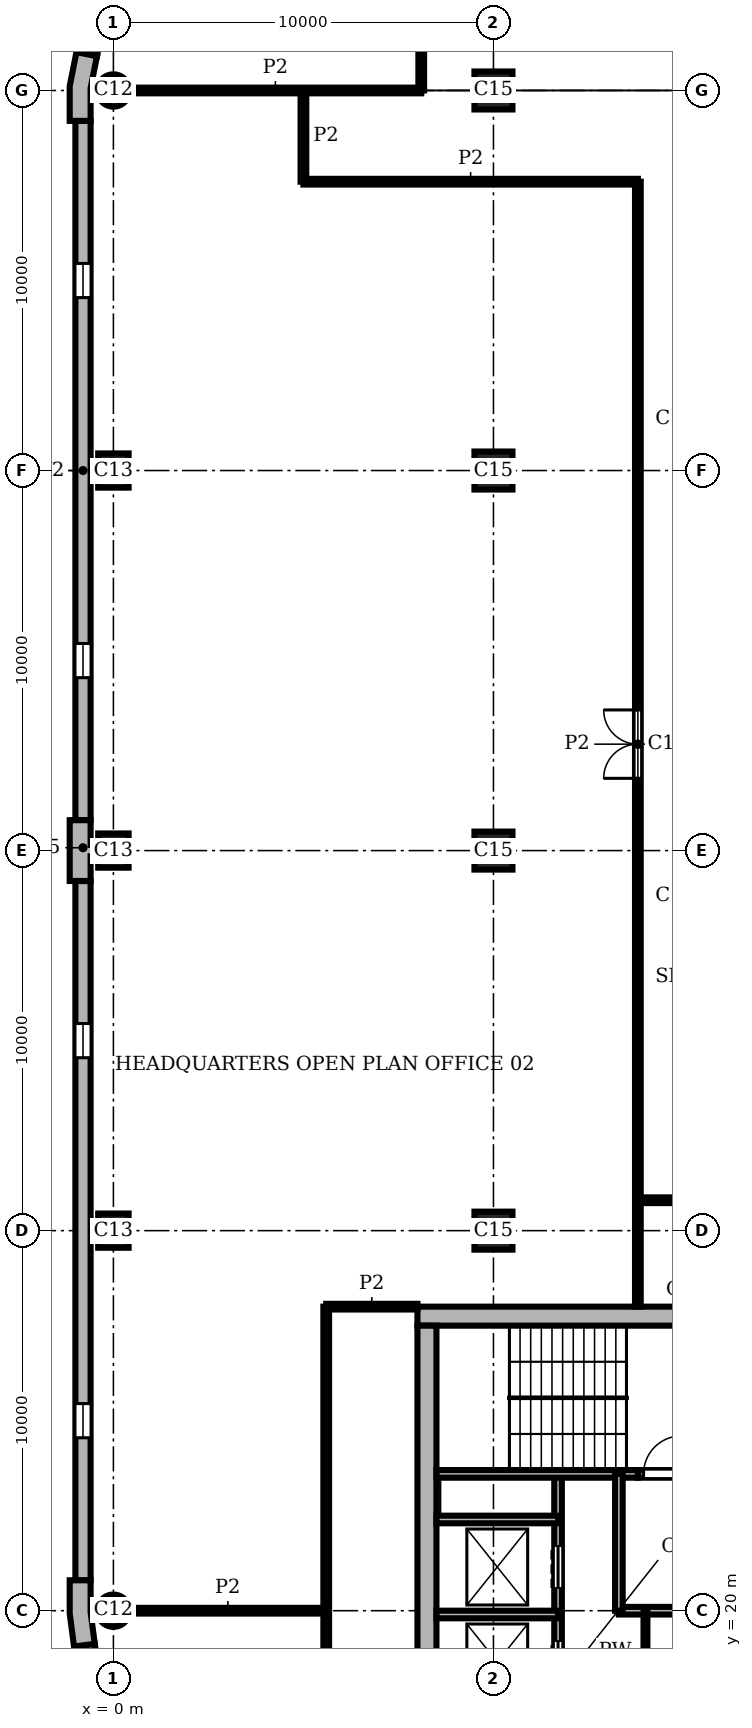
"""IFC4 building model, lengths in metres.
Left out: names, types, materials, properties, quantities, classifications, styles, units other than length and angle.
Written with IfcOpenShell. Run it as: python <this file> out.ifc"""

import sys

from ifc_helpers import new_model, si_unit, direction, frame, frame_2d, origin, origin_2d, place, context, subcontext, project, spatial, polyline, rectangle, circle, outline, extrude, element, fill, save


model = new_model("IFC4")
c1 = context("Model", 3, precision=1e-05, world=origin(), true_north=direction((0.0, 1.0)))
c2 = subcontext(c1, "Body", "Model", "MODEL_VIEW")
j1 = project(units=[si_unit("LENGTHUNIT", "METRE"), si_unit("PLANEANGLEUNIT", "RADIAN")], contexts=[c1])
p1 = place(None, origin())
s1 = spatial("IfcSite", under=j1, at=p1, CompositionType="ELEMENT")
p2 = place(p1, origin())
s2 = spatial("IfcBuilding", under=s1, at=p2, CompositionType="ELEMENT")
p3 = place(p2, frame((0.0, 0.0, 348.9)))
s3 = spatial("IfcBuildingStorey", under=s2, at=p3, CompositionType="ELEMENT", Elevation=348.9)
p4 = place(p3, frame((0.0, 60.0, 0.0), z_axis=(0.0, 0.0, 1.0), x_axis=(1.0, 0.0, 0.0)))
e1 = element("IfcColumn", 1, at=p4, inside=s3, PredefinedType="COLUMN", context=c2, shape_type="SweptSolid", body=[
    extrude(circle(Radius=0.425, at=origin_2d()), origin(), (0.0, 0.0, 1.0), 3.9),
])
for number, where, z_axis, x_axis in (
    (2, (0.0, 50.0, 0.0), (0.0, 0.0, 1.0), (0.0, 1.0, 0.0)),
    (3, (0.0, 40.0, 0.0), (0.0, 0.0, 1.0), (0.0, 1.0, 0.0)),
    (4, (0.0, 30.0, 0.0), (0.0, 0.0, 1.0), (0.0, 1.0, 0.0)),
):
    element("IfcColumn", number, at=place(p3, frame(where, z_axis=z_axis, x_axis=x_axis)), inside=s3, PredefinedType="COLUMN", context=c2, shape_type="SweptSolid", body=[
        extrude(rectangle(XDim=0.9, YDim=0.8, at=origin_2d()), origin(), (0.0, 0.0, 1.0), 3.9),
    ])
p5 = place(p3, frame((0.0, 20.0, 0.0), z_axis=(0.0, 0.0, 1.0), x_axis=(1.0, 0.0, 0.0)))
e5 = element("IfcColumn", 5, at=p5, inside=s3, PredefinedType="COLUMN", context=c2, shape_type="SweptSolid", body=[
    extrude(circle(Radius=0.425, at=origin_2d()), origin(), (0.0, 0.0, 1.0), 3.9),
])
for number, where, z_axis, x_axis in (
    (6, (10.0, 30.0, 0.0), (0.0, 0.0, 1.0), (1.0, 0.0, 0.0)),
    (7, (10.0, 40.0, 0.0), (0.0, 0.0, 1.0), (1.0, 0.0, 0.0)),
    (8, (10.0, 50.0, 0.0), (0.0, 0.0, 1.0), (1.0, 0.0, 0.0)),
    (9, (10.0, 60.0, 0.0), (0.0, 0.0, 1.0), (1.0, 0.0, 0.0)),
):
    element("IfcColumn", number, at=place(p3, frame(where, z_axis=z_axis, x_axis=x_axis)), inside=s3, PredefinedType="COLUMN", context=c2, shape_type="SweptSolid", body=[
        extrude(rectangle(XDim=1.0, YDim=1.0, at=origin_2d()), origin(), (0.0, 0.0, 1.0), 3.9),
    ])
p6 = place(p3, frame((28.0, 27.75, 0.0), z_axis=(0.0, 0.0, 1.0), x_axis=(-1.0, 0.0, 0.0)))
e10 = element("IfcWall", 10, at=p6, inside=s3, PredefinedType="SHEAR", context=c2, shape_type="SweptSolid", body=[
    extrude(rectangle(XDim=20.0, YDim=0.5, at=frame_2d((10.0, 0.0))), origin(), (0.0, 0.0, 1.0), 3.9),
])
p7 = place(p3, frame((8.25, 27.5, 0.0), z_axis=(0.0, 0.0, 1.0), x_axis=(0.0, -1.0, 0.0)))
e11 = element("IfcWall", 11, at=p7, inside=s3, PredefinedType="SHEAR", context=c2, shape_type="SweptSolid", body=[
    extrude(rectangle(XDim=19.0, YDim=0.5, at=frame_2d((9.5, 0.0))), origin(), (0.0, 0.0, 1.0), 3.9),
])
p8 = place(p3, origin())
e12 = element("IfcWall", 12, at=p8, inside=s3, PredefinedType="SOLIDWALL", context=c2, shape_type="SweptSolid", body=[
    extrude(outline(polyline([(-0.825, 60.98), (-0.972, 61.009), (-1.15, 60.113), (-1.15, 59.2), (-1.0, 59.2), (-0.6, 59.2), (-0.6, 60.059), (-0.432, 60.902), (-0.825, 60.98)])), origin(), (0.0, 0.0, 1.0), 3.9),
])
e13 = element("IfcWall", 13, at=p8, inside=s3, PredefinedType="SOLIDWALL", context=c2, shape_type="SweptSolid", body=[
    extrude(outline(polyline([(-0.6, 39.2), (-0.6, 39.85), (-0.45, 39.85), (-0.45, 40.15), (-0.6, 40.15), (-0.6, 40.8), (-1.0, 40.8), (-1.15, 40.8), (-1.15, 40.0), (-1.15, 39.2), (-1.0, 39.2), (-0.6, 39.2)])), origin(), (0.0, 0.0, 1.0), 3.9),
])
e14 = element("IfcWall", 14, at=p8, inside=s3, PredefinedType="SOLIDWALL", context=c2, shape_type="SweptSolid", body=[
    extrude(outline(polyline([(-1.0, 20.8), (-1.15, 20.8), (-1.15, 19.925), (-1.036, 19.057), (-0.887, 19.076), (-0.49, 19.128), (-0.6, 19.961), (-0.6, 20.8), (-1.0, 20.8)])), origin(), (0.0, 0.0, 1.0), 3.9),
])
p9 = place(p3, frame((0.299, 65.602, 0.0), z_axis=(0.0, 0.0, 1.0), x_axis=(-0.195098533057, -0.98078364709, 0.0)))
e15 = element("IfcWall", 15, at=p9, inside=s3, PredefinedType="SOLIDWALL", context=c2, shape_type="SweptSolid", body=[
    extrude(rectangle(XDim=4.753, YDim=0.4, at=frame_2d((2.376, 0.0))), origin(), (0.0, 0.0, 1.0), 3.9),
])
p10 = place(p9, frame((0.226, 0.0, 0.9)))
e16 = element("IfcOpeningElement", 16, at=p10, cuts=e15, PredefinedType="OPENING", context=c2, shape_type="SweptSolid", body=[
    extrude(rectangle(XDim=4.3, YDim=2.35, at=frame_2d((2.15, 1.175))), frame((0.0, 0.21, 0.0), z_axis=(0.0, -1.0, 0.0), x_axis=(1.0, 0.0, 0.0)), (0.0, 0.0, 1.0), 0.42),
])
p11 = place(p3, frame((-0.8, 59.2, 0.0), z_axis=(0.0, 0.0, 1.0), x_axis=(0.0, -1.0, 0.0)))
e17 = element("IfcWall", 17, at=p11, inside=s3, PredefinedType="SOLIDWALL", context=c2, shape_type="SweptSolid", body=[
    extrude(rectangle(XDim=18.4, YDim=0.4, at=frame_2d((9.2, 0.0))), origin(), (0.0, 0.0, 1.0), 3.9),
])
p12 = place(p11, frame((3.75, 0.0, 0.9)))
e18 = element("IfcOpeningElement", 18, at=p12, cuts=e17, PredefinedType="OPENING", context=c2, shape_type="SweptSolid", body=[
    extrude(rectangle(XDim=0.9, YDim=2.35, at=frame_2d((0.45, 1.175))), frame((0.0, 0.21, 0.0), z_axis=(0.0, -1.0, 0.0), x_axis=(1.0, 0.0, 0.0)), (0.0, 0.0, 1.0), 0.42),
])
p13 = place(p11, frame((13.75, 0.0, 0.9)))
e19 = element("IfcOpeningElement", 19, at=p13, cuts=e17, PredefinedType="OPENING", context=c2, shape_type="SweptSolid", body=[
    extrude(rectangle(XDim=0.9, YDim=2.35, at=frame_2d((0.45, 1.175))), frame((0.0, 0.21, 0.0), z_axis=(0.0, -1.0, 0.0), x_axis=(1.0, 0.0, 0.0)), (0.0, 0.0, 1.0), 0.42),
])
p14 = place(p3, frame((-0.8, 39.2, 0.0), z_axis=(0.0, 0.0, 1.0), x_axis=(0.0, -1.0, 0.0)))
e20 = element("IfcWall", 20, at=p14, inside=s3, PredefinedType="SOLIDWALL", context=c2, shape_type="SweptSolid", body=[
    extrude(rectangle(XDim=18.4, YDim=0.4, at=frame_2d((9.2, 0.0))), origin(), (0.0, 0.0, 1.0), 3.9),
])
p15 = place(p14, frame((3.75, 0.0, 0.9)))
e21 = element("IfcOpeningElement", 21, at=p15, cuts=e20, PredefinedType="OPENING", context=c2, shape_type="SweptSolid", body=[
    extrude(rectangle(XDim=0.9, YDim=2.35, at=frame_2d((0.45, 1.175))), frame((0.0, 0.21, 0.0), z_axis=(0.0, -1.0, 0.0), x_axis=(1.0, 0.0, 0.0)), (0.0, 0.0, 1.0), 0.42),
])
p16 = place(p14, frame((13.75, 0.0, 0.9)))
e22 = element("IfcOpeningElement", 22, at=p16, cuts=e20, PredefinedType="OPENING", context=c2, shape_type="SweptSolid", body=[
    extrude(rectangle(XDim=0.9, YDim=2.35, at=frame_2d((0.45, 1.175))), frame((0.0, 0.21, 0.0), z_axis=(0.0, -1.0, 0.0), x_axis=(1.0, 0.0, 0.0)), (0.0, 0.0, 1.0), 0.42),
])
p17 = place(p3, frame((-0.689, 19.102, 0.0), z_axis=(0.0, 0.0, 1.0), x_axis=(0.130514280502, -0.991446429508, 0.0)))
e23 = element("IfcWall", 23, at=p17, inside=s3, PredefinedType="SOLIDWALL", context=c2, shape_type="SweptSolid", body=[
    extrude(rectangle(XDim=4.121, YDim=0.4, at=frame_2d((2.061, 0.0))), origin(), (0.0, 0.0, 1.0), 3.9),
])
p18 = place(p17, frame((1.611, 0.0, 0.9)))
e24 = element("IfcOpeningElement", 24, at=p18, cuts=e23, PredefinedType="OPENING", context=c2, shape_type="SweptSolid", body=[
    extrude(rectangle(XDim=0.9, YDim=2.35, at=frame_2d((0.45, 1.175))), frame((0.0, 0.21, 0.0), z_axis=(0.0, -1.0, 0.0), x_axis=(1.0, 0.0, 0.0)), (0.0, 0.0, 1.0), 0.42),
])
p19 = place(p3, frame((8.5, 19.9, 0.0), z_axis=(0.0, 0.0, 1.0), x_axis=(1.0, 0.0, 0.0)))
e25 = element("IfcWall", 25, at=p19, inside=s3, PredefinedType="SHEAR", context=c2, shape_type="SweptSolid", body=[
    extrude(rectangle(XDim=3.2, YDim=0.2, at=frame_2d((1.6, 0.0))), origin(), (0.0, 0.0, 1.0), 3.45),
])
p20 = place(p3, frame((13.3, 20.0, 0.0), z_axis=(0.0, 0.0, 1.0), x_axis=(1.0, 0.0, 0.0)))
e26 = element("IfcWall", 26, at=p20, inside=s3, PredefinedType="SHEAR", context=c2, shape_type="SweptSolid", body=[
    extrude(rectangle(XDim=4.7, YDim=0.2, at=frame_2d((2.35, 0.0))), origin(), (0.0, 0.0, 1.0), 3.45),
])
p21 = place(p3, frame((8.5, 22.4, 0.0), z_axis=(0.0, 0.0, 1.0), x_axis=(1.0, 0.0, 0.0)))
e27 = element("IfcWall", 27, at=p21, inside=s3, PredefinedType="SHEAR", context=c2, shape_type="SweptSolid", body=[
    extrude(rectangle(XDim=3.2, YDim=0.2, at=frame_2d((1.6, 0.0))), origin(), (0.0, 0.0, 1.0), 3.45),
])
p22 = place(p3, frame((8.5, 23.6, 0.0), z_axis=(0.0, 0.0, 1.0), x_axis=(1.0, 0.0, 0.0)))
e28 = element("IfcWall", 28, at=p22, inside=s3, PredefinedType="SHEAR", context=c2, shape_type="SweptSolid", body=[
    extrude(rectangle(XDim=5.3, YDim=0.2, at=frame_2d((2.65, 0.0))), origin(), (0.0, 0.0, 1.0), 3.45),
])
p23 = place(p3, frame((13.8, 23.6, 0.0), z_axis=(0.0, 0.0, 1.0), x_axis=(1.0, 0.0, 0.0)))
e29 = element("IfcWall", 29, at=p23, inside=s3, PredefinedType="SHEAR", context=c2, shape_type="SweptSolid", body=[
    extrude(rectangle(XDim=13.7, YDim=0.2, at=frame_2d((6.85, 0.0))), origin(), (0.0, 0.0, 1.0), 3.45),
])
p24 = place(p23, frame((2.4, 0.0, 0.0)))
e30 = element("IfcOpeningElement", 30, at=p24, cuts=e29, PredefinedType="OPENING", context=c2, shape_type="SweptSolid", body=[
    extrude(rectangle(XDim=1.1, YDim=2.1, at=frame_2d((0.55, 1.05))), frame((0.0, 0.11, 0.0), z_axis=(0.0, -1.0, 0.0), x_axis=(1.0, 0.0, 0.0)), (0.0, 0.0, 1.0), 0.22),
])
p25 = place(p23, frame((4.9, 0.0, 0.0)))
e31 = element("IfcOpeningElement", 31, at=p25, cuts=e29, PredefinedType="OPENING", context=c2, shape_type="SweptSolid", body=[
    extrude(rectangle(XDim=1.1, YDim=2.1, at=frame_2d((0.55, 1.05))), frame((0.0, 0.11, 0.0), z_axis=(0.0, -1.0, 0.0), x_axis=(1.0, 0.0, 0.0)), (0.0, 0.0, 1.0), 0.22),
])
p26 = place(p23, frame((0.15, 0.0, 0.0)))
e32 = element("IfcOpeningElement", 32, at=p26, cuts=e29, PredefinedType="OPENING", context=c2, shape_type="SweptSolid", body=[
    extrude(rectangle(XDim=1.0, YDim=2.1, at=frame_2d((0.5, 1.05))), frame((0.0, 0.11, 0.0), z_axis=(0.0, -1.0, 0.0), x_axis=(1.0, 0.0, 0.0)), (0.0, 0.0, 1.0), 0.22),
])
p27 = place(p3, frame((11.7, 12.4, 0.0), z_axis=(0.0, 0.0, 1.0), x_axis=(0.0, 1.0, 0.0)))
e33 = element("IfcWall", 33, at=p27, inside=s3, PredefinedType="SHEAR", context=c2, shape_type="SweptSolid", body=[
    extrude(rectangle(XDim=11.2, YDim=0.2, at=frame_2d((5.6, 0.0))), origin(), (0.0, 0.0, 1.0), 3.45),
])
p28 = place(p27, frame((0.7, 0.0, 0.0)))
e34 = element("IfcOpeningElement", 34, at=p28, cuts=e33, PredefinedType="OPENING", context=c2, shape_type="SweptSolid", body=[
    extrude(rectangle(XDim=1.1, YDim=2.1, at=frame_2d((0.55, 1.05))), frame((0.0, 0.11, 0.0), z_axis=(0.0, -1.0, 0.0), x_axis=(1.0, 0.0, 0.0)), (0.0, 0.0, 1.0), 0.22),
])
p29 = place(p27, frame((3.2, 0.0, 0.0)))
e35 = element("IfcOpeningElement", 35, at=p29, cuts=e33, PredefinedType="OPENING", context=c2, shape_type="SweptSolid", body=[
    extrude(rectangle(XDim=1.1, YDim=2.1, at=frame_2d((0.55, 1.05))), frame((0.0, 0.11, 0.0), z_axis=(0.0, -1.0, 0.0), x_axis=(1.0, 0.0, 0.0)), (0.0, 0.0, 1.0), 0.22),
])
p30 = place(p27, frame((5.7, 0.0, 0.0)))
e36 = element("IfcOpeningElement", 36, at=p30, cuts=e33, PredefinedType="OPENING", context=c2, shape_type="SweptSolid", body=[
    extrude(rectangle(XDim=1.1, YDim=2.1, at=frame_2d((0.55, 1.05))), frame((0.0, 0.11, 0.0), z_axis=(0.0, -1.0, 0.0), x_axis=(1.0, 0.0, 0.0)), (0.0, 0.0, 1.0), 0.22),
])
p31 = place(p27, frame((8.2, 0.0, 0.0)))
e37 = element("IfcOpeningElement", 37, at=p31, cuts=e33, PredefinedType="OPENING", context=c2, shape_type="SweptSolid", body=[
    extrude(rectangle(XDim=1.1, YDim=2.1, at=frame_2d((0.55, 1.05))), frame((0.0, 0.11, 0.0), z_axis=(0.0, -1.0, 0.0), x_axis=(1.0, 0.0, 0.0)), (0.0, 0.0, 1.0), 0.22),
])
p32 = place(p3, frame((13.3, 20.0, 0.0), z_axis=(0.0, 0.0, 1.0), x_axis=(0.0, 1.0, 0.0)))
e38 = element("IfcWall", 38, at=p32, inside=s3, PredefinedType="SHEAR", context=c2, shape_type="SweptSolid", body=[
    extrude(rectangle(XDim=3.6, YDim=0.2, at=frame_2d((1.8, 0.0))), origin(), (0.0, 0.0, 1.0), 3.45),
])
p33 = place(p3, frame((14.0, 16.2, 0.0), z_axis=(0.0, 0.0, 1.0), x_axis=(0.0, 1.0, 0.0)))
e39 = element("IfcWall", 39, at=p33, inside=s3, PredefinedType="PARTITIONING", context=c2, shape_type="SweptSolid", body=[
    extrude(rectangle(XDim=3.8, YDim=0.1, at=frame_2d((1.9, 0.0))), origin(), (0.0, 0.0, 1.0), 3.45),
])
p34 = place(p3, frame((5.0, 57.6, 0.0), z_axis=(0.0, 0.0, 1.0), x_axis=(0.0, 1.0, 0.0)))
e40 = element("IfcWall", 40, at=p34, inside=s3, PredefinedType="PARTITIONING", context=c2, shape_type="SweptSolid", body=[
    extrude(rectangle(XDim=2.4, YDim=0.15, at=frame_2d((1.2, 0.0))), origin(), (0.0, 0.0, 1.0), 3.45),
])
p35 = place(p3, frame((5.6, 5.6, 0.0), z_axis=(0.0, 0.0, 1.0), x_axis=(0.0, 1.0, 0.0)))
e41 = element("IfcWall", 41, at=p35, inside=s3, PredefinedType="PARTITIONING", context=c2, shape_type="SweptSolid", body=[
    extrude(rectangle(XDim=22.4, YDim=0.15, at=frame_2d((11.2, 0.0))), origin(), (0.0, 0.0, 1.0), 3.45),
])
p36 = place(p35, frame((5.35, 0.0, 0.0)))
e42 = element("IfcOpeningElement", 42, at=p36, cuts=e41, PredefinedType="OPENING", context=c2, shape_type="SweptSolid", body=[
    extrude(rectangle(XDim=0.8, YDim=2.1, at=frame_2d((0.4, 1.05))), frame((0.0, 0.085, 0.0), z_axis=(0.0, -1.0, 0.0), x_axis=(1.0, 0.0, 0.0)), (0.0, 0.0, 1.0), 0.17),
])
p37 = place(p35, frame((11.0, 0.0, 0.0)))
e43 = element("IfcOpeningElement", 43, at=p37, cuts=e41, PredefinedType="OPENING", context=c2, shape_type="SweptSolid", body=[
    extrude(rectangle(XDim=1.1, YDim=2.1, at=frame_2d((0.55, 1.05))), frame((0.0, 0.085, 0.0), z_axis=(0.0, -1.0, 0.0), x_axis=(1.0, 0.0, 0.0)), (0.0, 0.0, 1.0), 0.17),
])
p38 = place(p3, frame((8.1, 60.0, 0.0), z_axis=(0.0, 0.0, 1.0), x_axis=(0.0, 1.0, 0.0)))
e44 = element("IfcWall", 44, at=p38, inside=s3, PredefinedType="PARTITIONING", context=c2, shape_type="SweptSolid", body=[
    extrude(rectangle(XDim=6.4, YDim=0.15, at=frame_2d((3.2, 0.0))), origin(), (0.0, 0.0, 1.0), 3.45),
])
p39 = place(p38, frame((2.35, 0.0, 0.0)))
e45 = element("IfcOpeningElement", 45, at=p39, cuts=e44, PredefinedType="OPENING", context=c2, shape_type="SweptSolid", body=[
    extrude(rectangle(XDim=1.0, YDim=2.1, at=frame_2d((0.5, 1.05))), frame((0.0, 0.085, 0.0), z_axis=(0.0, -1.0, 0.0), x_axis=(1.0, 0.0, 0.0)), (0.0, 0.0, 1.0), 0.17),
])
p40 = place(p3, frame((13.8, 28.0, 0.0), z_axis=(0.0, 0.0, 1.0), x_axis=(0.0, 1.0, 0.0)))
e46 = element("IfcWall", 46, at=p40, inside=s3, PredefinedType="PARTITIONING", context=c2, shape_type="SweptSolid", body=[
    extrude(rectangle(XDim=29.6, YDim=0.15, at=frame_2d((14.8, 0.0))), origin(), (0.0, 0.0, 1.0), 3.45),
])
p41 = place(p40, frame((13.901, 0.0, 0.0)))
e47 = element("IfcOpeningElement", 47, at=p41, cuts=e46, PredefinedType="OPENING", context=c2, shape_type="SweptSolid", body=[
    extrude(rectangle(XDim=1.8, YDim=2.1, at=frame_2d((0.9, 1.05))), frame((0.0, 0.085, 0.0), z_axis=(0.0, -1.0, 0.0), x_axis=(1.0, 0.0, 0.0)), (0.0, 0.0, 1.0), 0.17),
])
p42 = place(p3, frame((0.425, 20.0, 0.0), z_axis=(0.0, 0.0, 1.0), x_axis=(1.0, 0.0, 0.0)))
e48 = element("IfcWall", 48, at=p42, inside=s3, PredefinedType="PARTITIONING", context=c2, shape_type="SweptSolid", body=[
    extrude(rectangle(XDim=5.175, YDim=0.15, at=frame_2d((2.587, 0.0))), origin(), (0.0, 0.0, 1.0), 3.45),
])
p43 = place(p3, frame((5.6, 28.0, 0.0), z_axis=(0.0, 0.0, 1.0), x_axis=(1.0, 0.0, 0.0)))
e49 = element("IfcWall", 49, at=p43, inside=s3, PredefinedType="PARTITIONING", context=c2, shape_type="SweptSolid", body=[
    extrude(rectangle(XDim=2.4, YDim=0.15, at=frame_2d((1.2, 0.0))), origin(), (0.0, 0.0, 1.0), 3.45),
])
p44 = place(p3, frame((13.802, 30.8, 0.0), z_axis=(0.0, 0.0, 1.0), x_axis=(1.0, 0.0, 0.0)))
e50 = element("IfcWall", 50, at=p44, inside=s3, PredefinedType="PARTITIONING", context=c2, shape_type="SweptSolid", body=[
    extrude(rectangle(XDim=16.998, YDim=0.15, at=frame_2d((8.499, 0.0))), origin(), (0.0, 0.0, 1.0), 3.45),
])
p45 = place(p44, frame((9.35, 0.0, 0.0)))
e51 = element("IfcOpeningElement", 51, at=p45, cuts=e50, PredefinedType="OPENING", context=c2, shape_type="SweptSolid", body=[
    extrude(rectangle(XDim=1.0, YDim=2.1, at=frame_2d((0.5, 1.05))), frame((0.0, 0.085, 0.0), z_axis=(0.0, -1.0, 0.0), x_axis=(1.0, 0.0, 0.0)), (0.0, 0.0, 1.0), 0.17),
])
p46 = place(p3, frame((5.0, 57.6, 0.0), z_axis=(0.0, 0.0, 1.0), x_axis=(1.0, 0.0, 0.0)))
e52 = element("IfcWall", 52, at=p46, inside=s3, PredefinedType="PARTITIONING", context=c2, shape_type="SweptSolid", body=[
    extrude(rectangle(XDim=8.8, YDim=0.15, at=frame_2d((4.4, 0.0))), origin(), (0.0, 0.0, 1.0), 3.45),
])
p47 = place(p3, frame((0.425, 60.0, 0.0), z_axis=(0.0, 0.0, 1.0), x_axis=(1.0, 0.0, 0.0)))
e53 = element("IfcWall", 53, at=p47, inside=s3, PredefinedType="PARTITIONING", context=c2, shape_type="SweptSolid", body=[
    extrude(rectangle(XDim=7.675, YDim=0.15, at=frame_2d((3.837, 0.0))), origin(), (0.0, 0.0, 1.0), 3.45),
])
p48 = place(p12, origin())
e54 = element("IfcWindow", 54, at=p48, inside=s3, PartitioningType="SINGLE_PANEL", PredefinedType="WINDOW", context=c2, shape_type="SweptSolid", body=[
    extrude(rectangle(XDim=0.9, YDim=2.35, at=frame_2d((0.45, 1.175))), frame((0.0, 0.16, 0.0), z_axis=(0.0, -1.0, 0.0), x_axis=(1.0, 0.0, 0.0)), (0.0, 0.0, 1.0), 0.06),
])
fill(e18, e54)
p49 = place(p13, origin())
e55 = element("IfcWindow", 55, at=p49, inside=s3, PartitioningType="SINGLE_PANEL", PredefinedType="WINDOW", context=c2, shape_type="SweptSolid", body=[
    extrude(rectangle(XDim=0.9, YDim=2.35, at=frame_2d((0.45, 1.175))), frame((0.0, 0.16, 0.0), z_axis=(0.0, -1.0, 0.0), x_axis=(1.0, 0.0, 0.0)), (0.0, 0.0, 1.0), 0.06),
])
fill(e19, e55)
p50 = place(p15, origin())
e56 = element("IfcWindow", 56, at=p50, inside=s3, PartitioningType="SINGLE_PANEL", PredefinedType="WINDOW", context=c2, shape_type="SweptSolid", body=[
    extrude(rectangle(XDim=0.9, YDim=2.35, at=frame_2d((0.45, 1.175))), frame((0.0, 0.16, 0.0), z_axis=(0.0, -1.0, 0.0), x_axis=(1.0, 0.0, 0.0)), (0.0, 0.0, 1.0), 0.06),
])
fill(e21, e56)
p51 = place(p16, origin())
e57 = element("IfcWindow", 57, at=p51, inside=s3, PartitioningType="SINGLE_PANEL", PredefinedType="WINDOW", context=c2, shape_type="SweptSolid", body=[
    extrude(rectangle(XDim=0.9, YDim=2.35, at=frame_2d((0.45, 1.175))), frame((0.0, 0.16, 0.0), z_axis=(0.0, -1.0, 0.0), x_axis=(1.0, 0.0, 0.0)), (0.0, 0.0, 1.0), 0.06),
])
fill(e22, e57)
p52 = place(p30, origin())
e58 = element("IfcDoor", 58, at=p52, inside=s3, OperationType="DOUBLE_DOOR_SLIDING", PredefinedType="DOOR", context=c2, shape_type="SweptSolid", body=[
    extrude(rectangle(XDim=1.1, YDim=2.1, at=frame_2d((0.55, 1.05))), frame((0.0, 0.025, 0.0), z_axis=(0.0, -1.0, 0.0), x_axis=(1.0, 0.0, 0.0)), (0.0, 0.0, 1.0), 0.05),
])
fill(e36, e58)
p53 = place(p31, origin())
e59 = element("IfcDoor", 59, at=p53, inside=s3, OperationType="DOUBLE_DOOR_SLIDING", PredefinedType="DOOR", context=c2, shape_type="SweptSolid", body=[
    extrude(rectangle(XDim=1.1, YDim=2.1, at=frame_2d((0.55, 1.05))), frame((0.0, 0.025, 0.0), z_axis=(0.0, -1.0, 0.0), x_axis=(1.0, 0.0, 0.0)), (0.0, 0.0, 1.0), 0.05),
])
fill(e37, e59)
p54 = place(p26, origin())
e60 = element("IfcDoor", 60, at=p54, inside=s3, OperationType="SINGLE_SWING_RIGHT", PredefinedType="DOOR", context=c2, shape_type="SweptSolid", body=[
    extrude(rectangle(XDim=1.0, YDim=2.1, at=frame_2d((0.5, 1.05))), frame((0.0, 0.025, 0.0), z_axis=(0.0, -1.0, 0.0), x_axis=(1.0, 0.0, 0.0)), (0.0, 0.0, 1.0), 0.05),
])
fill(e32, e60)
p55 = place(p41, origin())
e61 = element("IfcDoor", 61, at=p55, inside=s3, OperationType="DOUBLE_DOOR_SINGLE_SWING", PredefinedType="DOOR", context=c2, shape_type="SweptSolid", body=[
    extrude(rectangle(XDim=1.8, YDim=2.1, at=frame_2d((0.9, 1.05))), frame((0.0, 0.025, 0.0), z_axis=(0.0, -1.0, 0.0), x_axis=(1.0, 0.0, 0.0)), (0.0, 0.0, 1.0), 0.05),
])
fill(e47, e61)
save(model, sys.argv[1])
